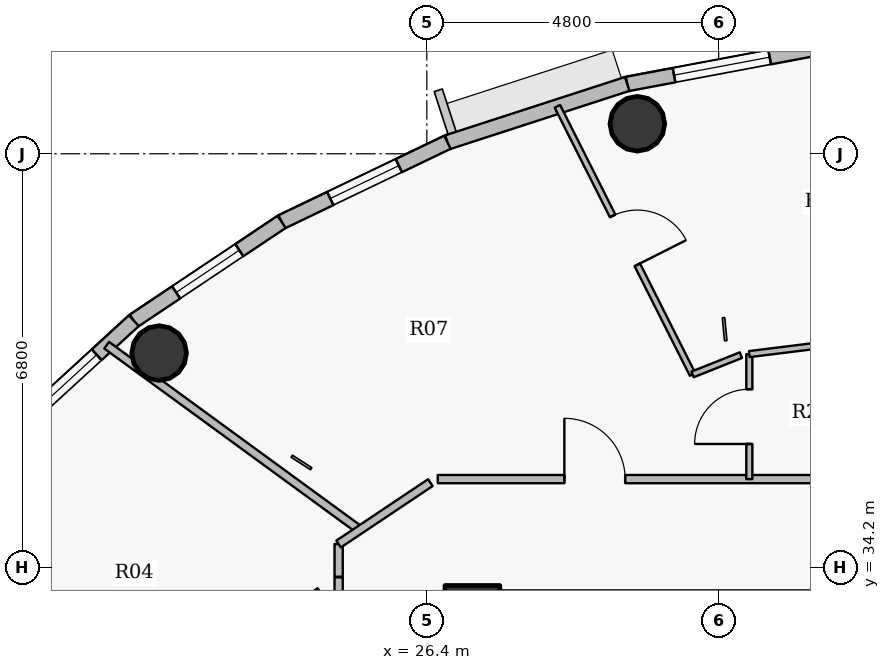
"""IFC4 building model, lengths in metres.
Left out: names, types, materials, properties, quantities, classifications, styles, units other than length and angle.
Written with IfcOpenShell. Run it as: python <this file> out.ifc"""

import sys

from ifc_helpers import new_model, si_unit, direction, frame, frame_2d, origin, origin_2d, place, context, subcontext, project, spatial, rectangle, hollow_circle, extrude, source, transform, mapped, element, fill, save


model = new_model("IFC4")
c1 = context("Model", 3, precision=1e-05, world=origin(), true_north=direction((0.0, 1.0)))
c2 = subcontext(c1, "Body", "Model", "MODEL_VIEW")
j1 = project(units=[si_unit("LENGTHUNIT", "METRE"), si_unit("PLANEANGLEUNIT", "RADIAN")], contexts=[c1])
p1 = place(None, origin())
s1 = spatial("IfcSite", under=j1, at=p1, CompositionType="ELEMENT")
p2 = place(p1, origin())
s2 = spatial("IfcBuilding", under=s1, at=p2, CompositionType="ELEMENT")
p3 = place(p2, frame((0.0, 0.0, 327.8)))
s3 = spatial("IfcBuildingStorey", under=s2, at=p3, CompositionType="ELEMENT", Elevation=327.8)
p4 = place(p3, frame((27.15, 33.45, 0.0), z_axis=(0.0, 0.0, 1.0), x_axis=(1.0, 0.0, 0.0)))
e1 = element("IfcColumn", 1, at=p4, inside=s3, PredefinedType="COLUMN", context=c2, shape_type="SweptSolid", body=[
    extrude(rectangle(XDim=0.9, YDim=0.9, at=origin_2d()), origin(), (0.0, 0.0, 1.0), 3.8),
])
for number, where, z_axis, x_axis in (
    (2, (29.863, 41.494, 0.0), (0.0, 0.0, 1.0), (1.0, 0.0, 0.0)),
    (3, (21.998, 37.723, 0.0), (0.0, 0.0, 1.0), (1.0, 0.0, 0.0)),
):
    element("IfcColumn", number, at=place(p3, frame(where, z_axis=z_axis, x_axis=x_axis)), inside=s3, PredefinedType="COLUMN", context=c2, shape_type="SweptSolid", body=[
        extrude(hollow_circle(Radius=0.45, WallThickness=0.028, at=origin_2d()), origin(), (0.0, 0.0, 1.0), 3.8),
    ])
p5 = place(p3, frame((29.696, 42.148, 0.0), z_axis=(0.0, 0.0, 1.0), x_axis=(0.98276643264, 0.184851667226, 0.0)))
e4 = element("IfcWall", 4, at=p5, inside=s3, PredefinedType="SOLIDWALL", context=c2, shape_type="SweptSolid", body=[
    extrude(rectangle(XDim=3.167, YDim=0.24, at=frame_2d((1.583, 0.0))), origin(), (0.0, 0.0, 1.0), 3.55),
])
p6 = place(p5, frame((0.784, 0.0, 0.9)))
e5 = element("IfcOpeningElement", 5, at=p6, cuts=e4, PredefinedType="OPENING", context=c2, shape_type="SweptSolid", body=[
    extrude(rectangle(XDim=1.6, YDim=1.75, at=origin_2d()), frame((0.8, 0.13, 0.875), z_axis=(0.0, -1.0, 0.0), x_axis=(1.0, 0.0, 0.0)), (0.0, 0.0, 1.0), 0.26),
])
p7 = place(p3, frame((26.74, 41.189, 0.0), z_axis=(0.0, 0.0, 1.0), x_axis=(0.951212850731, 0.308535431682, 0.0)))
e6 = element("IfcWall", 6, at=p7, inside=s3, PredefinedType="SOLIDWALL", context=c2, shape_type="SweptSolid", body=[
    extrude(rectangle(XDim=3.108, YDim=0.24, at=frame_2d((1.554, 0.0))), origin(), (0.0, 0.0, 1.0), 3.55),
])
p8 = place(p3, frame((24.012, 39.88, 0.0), z_axis=(0.0, 0.0, 1.0), x_axis=(0.901557057889, 0.432660226241, 0.0)))
e7 = element("IfcWall", 7, at=p8, inside=s3, PredefinedType="SOLIDWALL", context=c2, shape_type="SweptSolid", body=[
    extrude(rectangle(XDim=3.025, YDim=0.24, at=frame_2d((1.513, 0.0))), origin(), (0.0, 0.0, 1.0), 3.55),
])
p9 = place(p8, frame((0.888, 0.0, 0.9)))
e8 = element("IfcOpeningElement", 8, at=p9, cuts=e7, PredefinedType="OPENING", context=c2, shape_type="SweptSolid", body=[
    extrude(rectangle(XDim=1.25, YDim=1.65, at=origin_2d()), frame((0.625, 0.13, 0.825), z_axis=(0.0, -1.0, 0.0), x_axis=(1.0, 0.0, 0.0)), (0.0, 0.0, 1.0), 0.26),
])
p10 = place(p3, frame((21.581, 38.254, 0.0), z_axis=(0.0, 0.0, 1.0), x_axis=(0.831201688654, 0.555970999944, 0.0)))
e9 = element("IfcWall", 9, at=p10, inside=s3, PredefinedType="SOLIDWALL", context=c2, shape_type="SweptSolid", body=[
    extrude(rectangle(XDim=2.925, YDim=0.24, at=frame_2d((1.462, 0.0))), origin(), (0.0, 0.0, 1.0), 3.55),
])
p11 = place(p10, frame((0.837, 0.0, 0.9)))
e10 = element("IfcOpeningElement", 10, at=p11, cuts=e9, PredefinedType="OPENING", context=c2, shape_type="SweptSolid", body=[
    extrude(rectangle(XDim=1.25, YDim=1.65, at=origin_2d()), frame((0.625, 0.13, 0.825), z_axis=(0.0, -1.0, 0.0), x_axis=(1.0, 0.0, 0.0)), (0.0, 0.0, 1.0), 0.26),
])
p12 = place(p3, frame((19.507, 36.352, 0.0), z_axis=(0.0, 0.0, 1.0), x_axis=(0.737020907932, 0.675869944051, 0.0)))
e11 = element("IfcWall", 11, at=p12, inside=s3, PredefinedType="SOLIDWALL", context=c2, shape_type="SweptSolid", body=[
    extrude(rectangle(XDim=2.815, YDim=0.24, at=frame_2d((1.407, 0.0))), origin(), (0.0, 0.0, 1.0), 3.55),
])
p13 = place(p12, frame((0.737, 0.0, 0.9)))
e12 = element("IfcOpeningElement", 12, at=p13, cuts=e11, PredefinedType="OPENING", context=c2, shape_type="SweptSolid", body=[
    extrude(rectangle(XDim=1.25, YDim=1.65, at=origin_2d()), frame((0.625, 0.13, 0.825), z_axis=(0.0, -1.0, 0.0), x_axis=(1.0, 0.0, 0.0)), (0.0, 0.0, 1.0), 0.26),
])
p14 = place(p3, frame((21.135, 37.852, 0.0), z_axis=(0.0, 0.0, 1.0), x_axis=(0.807673223958, -0.589630361584, 0.0)))
e13 = element("IfcWall", 13, at=p14, inside=s3, PredefinedType="PARTITIONING", context=c2, shape_type="SweptSolid", body=[
    extrude(rectangle(XDim=5.152, YDim=0.135, at=frame_2d((2.576, 0.0))), origin(), (0.0, 0.0, 1.0), 3.035),
])
p15 = place(p3, frame((24.95, 34.044, 0.0), z_axis=(0.0, 0.0, 1.0), x_axis=(0.0, 1.0, 0.0)))
e14 = element("IfcWall", 14, at=p15, inside=s3, PredefinedType="PARTITIONING", context=c2, shape_type="SweptSolid", body=[
    extrude(rectangle(XDim=0.539, YDim=0.135, at=frame_2d((0.269, 0.0))), origin(), (0.0, 0.0, 1.0), 3.55),
])
p16 = place(p3, frame((24.95, 34.583, 0.0), z_axis=(0.0, 0.0, 1.0), x_axis=(0.831138642659, 0.556065244984, 0.0)))
e15 = element("IfcWall", 15, at=p16, inside=s3, PredefinedType="PARTITIONING", context=c2, shape_type="SweptSolid", body=[
    extrude(rectangle(XDim=1.815, YDim=0.135, at=frame_2d((0.907, 0.0))), origin(), (0.0, 0.0, 1.0), 3.085),
])
p17 = place(p3, frame((26.58, 35.65, 0.0), z_axis=(0.0, 0.0, 1.0), x_axis=(1.0, 0.0, 0.0)))
e16 = element("IfcWall", 16, at=p17, inside=s3, PredefinedType="PARTITIONING", context=c2, shape_type="SweptSolid", body=[
    extrude(rectangle(XDim=8.47, YDim=0.135, at=frame_2d((4.235, 0.0))), origin(), (0.0, 0.0, 1.0), 3.085),
])
p18 = place(p17, frame((2.082, 0.0, 0.0)))
e17 = element("IfcOpeningElement", 17, at=p18, cuts=e16, PredefinedType="OPENING", context=c2, shape_type="SweptSolid", body=[
    extrude(rectangle(XDim=1.0, YDim=2.15, at=origin_2d()), frame((0.5, 0.078, 1.075), z_axis=(0.0, -1.0, 0.0), x_axis=(1.0, 0.0, 0.0)), (0.0, 0.0, 1.0), 0.155),
])
p19 = place(p3, frame((28.548, 41.781, 0.0), z_axis=(0.0, 0.0, 1.0), x_axis=(0.450197256642, -0.892929129389, 0.0)))
e18 = element("IfcWall", 18, at=p19, inside=s3, PredefinedType="PARTITIONING", context=c2, shape_type="SweptSolid", body=[
    extrude(rectangle(XDim=4.938, YDim=0.1, at=frame_2d((2.469, 0.0))), origin(), (0.0, 0.0, 1.0), 3.035),
])
p20 = place(p19, frame((2.019, 0.0, 0.0)))
e19 = element("IfcOpeningElement", 19, at=p20, cuts=e18, PredefinedType="OPENING", context=c2, shape_type="SweptSolid", body=[
    extrude(rectangle(XDim=0.9, YDim=2.1, at=origin_2d()), frame((0.45, 0.06, 1.05), z_axis=(0.0, -1.0, 0.0), x_axis=(1.0, 0.0, 0.0)), (0.0, 0.0, 1.0), 0.12),
])
p21 = place(p3, frame((30.771, 37.371, 0.0), z_axis=(0.0, 0.0, 1.0), x_axis=(0.928810758689, 0.370554415091, 0.0)))
e20 = element("IfcWall", 20, at=p21, inside=s3, PredefinedType="PARTITIONING", context=c2, shape_type="SweptSolid", body=[
    extrude(rectangle(XDim=0.856, YDim=0.1, at=frame_2d((0.428, 0.0))), origin(), (0.0, 0.0, 1.0), 3.085),
])
p22 = place(p3, frame((31.704, 35.65, 0.0), z_axis=(0.0, 0.0, 1.0), x_axis=(0.0, 1.0, 0.0)))
e21 = element("IfcWall", 21, at=p22, inside=s3, PredefinedType="PARTITIONING", context=c2, shape_type="SweptSolid", body=[
    extrude(rectangle(XDim=2.056, YDim=0.1, at=frame_2d((1.028, 0.0))), origin(), (0.0, 0.0, 1.0), 3.085),
])
p23 = place(p22, frame((0.578, 0.0, 0.0)))
e22 = element("IfcOpeningElement", 22, at=p23, cuts=e21, PredefinedType="OPENING", context=c2, shape_type="SweptSolid", body=[
    extrude(rectangle(XDim=0.9, YDim=2.1, at=origin_2d()), frame((0.45, 0.06, 1.05), z_axis=(0.0, -1.0, 0.0), x_axis=(1.0, 0.0, 0.0)), (0.0, 0.0, 1.0), 0.12),
])
p24 = place(p3, frame((31.704, 37.706, 0.0), z_axis=(0.0, 0.0, 1.0), x_axis=(0.992391131504, 0.123125310604, 0.0)))
e23 = element("IfcWall", 23, at=p24, inside=s3, PredefinedType="PARTITIONING", context=c2, shape_type="SweptSolid", body=[
    extrude(rectangle(XDim=4.329, YDim=0.1, at=frame_2d((2.164, 0.0))), origin(), (0.0, 0.0, 1.0), 3.085),
])
p25 = place(p3, frame((24.95, 31.958, 0.0), z_axis=(0.0, 0.0, 1.0), x_axis=(0.0, 1.0, 0.0)))
e24 = element("IfcWall", 24, at=p25, inside=s3, PredefinedType="PARTITIONING", context=c2, shape_type="SweptSolid", body=[
    extrude(rectangle(XDim=2.076, YDim=0.135, at=frame_2d((1.038, 0.0))), origin(), (0.0, 0.0, 1.0), 3.55),
])
p26 = place(p3, frame((27.59, 33.8, 0.0), z_axis=(0.0, 0.0, 1.0), x_axis=(-1.0, 0.0, 0.0)))
e25 = element("IfcWall", 25, at=p26, inside=s3, PredefinedType="PARTITIONING", context=c2, shape_type="SweptSolid", body=[
    extrude(rectangle(XDim=0.79, YDim=0.135, at=frame_2d((0.395, 0.0))), origin(), (0.0, 0.0, 1.0), 3.085),
])
p27 = place(p3, frame((24.643, 33.803, 0.0), z_axis=(0.0, 0.0, 1.0), x_axis=(-0.787376183758, -0.616472826043, 0.0)))
e26 = element("IfcWall", 26, at=p27, inside=s3, PredefinedType="PARTITIONING", context=c2, shape_type="SweptSolid", body=[
    extrude(rectangle(XDim=0.32, YDim=0.135, at=frame_2d((0.16, 0.0))), origin(), (0.0, 0.0, 1.0), 3.55),
])
m1 = source(origin(), c2, "Body", "SweptSolid", [
    extrude(rectangle(XDim=1.6, YDim=1.75, at=origin_2d()), frame((0.8, 0.03, 0.875), z_axis=(0.0, -1.0, 0.0), x_axis=(1.0, 0.0, 0.0)), (0.0, 0.0, 1.0), 0.06),
])
p28 = place(p6, origin())
e27 = element("IfcWindow", 27, at=p28, inside=s3, PartitioningType="DOUBLE_PANEL_VERTICAL", PredefinedType="WINDOW", context=c2, shape_type="MappedRepresentation", body=[
    mapped(m1, transform((0.0, 0.0, 0.0), x_axis=(1.0, 0.0, 0.0), y_axis=(0.0, 1.0, 0.0), z_axis=(0.0, 0.0, 1.0), scale=1.0)),
])
fill(e5, e27)
m2 = source(origin(), c2, "Body", "SweptSolid", [
    extrude(rectangle(XDim=1.25, YDim=1.65, at=origin_2d()), frame((0.625, 0.03, 0.825), z_axis=(0.0, -1.0, 0.0), x_axis=(1.0, 0.0, 0.0)), (0.0, 0.0, 1.0), 0.06),
])
p29 = place(p9, origin())
e28 = element("IfcWindow", 28, at=p29, inside=s3, PartitioningType="SINGLE_PANEL", PredefinedType="WINDOW", context=c2, shape_type="MappedRepresentation", body=[
    mapped(m2, transform((0.0, 0.0, 0.0), x_axis=(1.0, 0.0, 0.0), y_axis=(0.0, 1.0, 0.0), z_axis=(0.0, 0.0, 1.0), scale=1.0)),
])
fill(e8, e28)
p30 = place(p11, origin())
e29 = element("IfcWindow", 29, at=p30, inside=s3, PartitioningType="SINGLE_PANEL", PredefinedType="WINDOW", context=c2, shape_type="MappedRepresentation", body=[
    mapped(m2, transform((0.0, 0.0, 0.0), x_axis=(1.0, 0.0, 0.0), y_axis=(0.0, 1.0, 0.0), z_axis=(0.0, 0.0, 1.0), scale=1.0)),
])
fill(e10, e29)
p31 = place(p13, origin())
e30 = element("IfcWindow", 30, at=p31, inside=s3, PartitioningType="SINGLE_PANEL", PredefinedType="WINDOW", context=c2, shape_type="MappedRepresentation", body=[
    mapped(m2, transform((0.0, 0.0, 0.0), x_axis=(1.0, 0.0, 0.0), y_axis=(0.0, 1.0, 0.0), z_axis=(0.0, 0.0, 1.0), scale=1.0)),
])
fill(e12, e30)
m3 = source(origin(), c2, "Body", "SweptSolid", [
    extrude(rectangle(XDim=1.0, YDim=2.15, at=origin_2d()), frame((0.5, 0.025, 1.075), z_axis=(0.0, -1.0, 0.0), x_axis=(1.0, 0.0, 0.0)), (0.0, 0.0, 1.0), 0.05),
])
p32 = place(p18, origin())
e31 = element("IfcDoor", 31, at=p32, inside=s3, OperationType="SINGLE_SWING_LEFT", PredefinedType="DOOR", context=c2, shape_type="MappedRepresentation", body=[
    mapped(m3, transform((0.0, 0.0, 0.0), x_axis=(1.0, 0.0, 0.0), y_axis=(0.0, 1.0, 0.0), z_axis=(0.0, 0.0, 1.0), scale=1.0)),
])
fill(e17, e31)
m4 = source(origin(), c2, "Body", "SweptSolid", [
    extrude(rectangle(XDim=0.9, YDim=2.1, at=origin_2d()), frame((0.45, 0.025, 1.05), z_axis=(0.0, -1.0, 0.0), x_axis=(1.0, 0.0, 0.0)), (0.0, 0.0, 1.0), 0.05),
])
p33 = place(p20, origin())
e32 = element("IfcDoor", 32, at=p33, inside=s3, OperationType="SINGLE_SWING_RIGHT", PredefinedType="DOOR", context=c2, shape_type="MappedRepresentation", body=[
    mapped(m4, transform((0.0, 0.0, 0.0), x_axis=(1.0, 0.0, 0.0), y_axis=(0.0, 1.0, 0.0), z_axis=(0.0, 0.0, 1.0), scale=1.0)),
])
fill(e19, e32)
p34 = place(p23, origin())
e33 = element("IfcDoor", 33, at=p34, inside=s3, OperationType="SINGLE_SWING_LEFT", PredefinedType="DOOR", context=c2, shape_type="MappedRepresentation", body=[
    mapped(m4, transform((0.0, 0.0, 0.0), x_axis=(1.0, 0.0, 0.0), y_axis=(0.0, 1.0, 0.0), z_axis=(0.0, 0.0, 1.0), scale=1.0)),
])
fill(e22, e33)
save(model, sys.argv[1])
